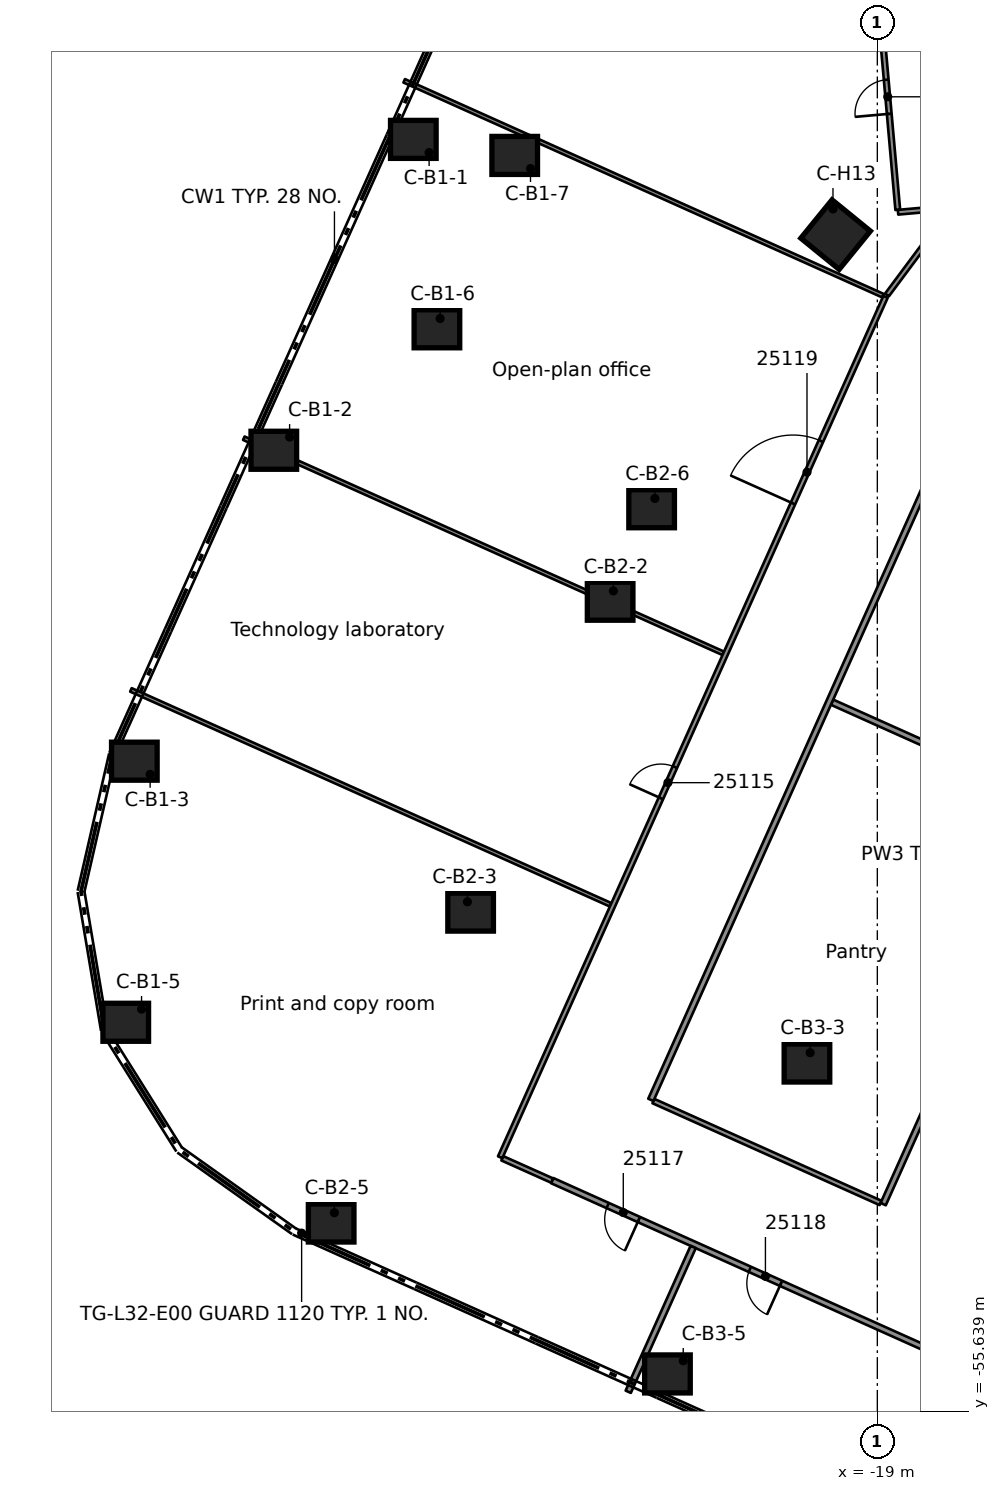
"""IFC4 building model, lengths in metres.
Left out: names, types, materials, properties, quantities, classifications, styles, units other than length and angle.
Written with IfcOpenShell. Run it as: python <this file> out.ifc"""

import sys

from ifc_helpers import new_model, si_unit, direction, frame, frame_2d, origin, origin_2d, place, context, subcontext, project, spatial, rectangle, extrude, element, fill, save


model = new_model("IFC4")
c1 = context("Model", 3, precision=1e-05, world=origin(), true_north=direction((0.0, 1.0)))
c2 = subcontext(c1, "Body", "Model", "MODEL_VIEW")
j1 = project(units=[si_unit("LENGTHUNIT", "METRE"), si_unit("PLANEANGLEUNIT", "RADIAN")], contexts=[c1])
p1 = place(None, origin())
s1 = spatial("IfcSite", under=j1, at=p1, CompositionType="ELEMENT")
p2 = place(p1, origin())
s2 = spatial("IfcBuilding", under=s1, at=p2, CompositionType="ELEMENT")
p3 = place(p2, frame((0.0, 0.0, 127.2)))
s3 = spatial("IfcBuildingStorey", under=s2, at=p3, CompositionType="ELEMENT", Elevation=127.2)
for number, where, z_axis, x_axis in (
    (1, (-31.21, -22.166, 0.0), (0.0, 0.0, 1.0), (1.0, 0.0, 0.0)),
    (2, (-34.881, -30.346, 0.0), (0.0, 0.0, 1.0), (1.0, 0.0, 0.0)),
    (3, (-38.551, -38.527, 0.0), (0.0, 0.0, 1.0), (1.0, 0.0, 0.0)),
    (4, (-38.777, -45.397, 0.0), (0.0, 0.0, 1.0), (1.0, 0.0, 0.0)),
    (5, (-30.589, -27.15, 0.0), (0.0, 0.0, 1.0), (1.0, 0.0, 0.0)),
    (6, (-28.542, -22.588, 0.0), (0.0, 0.0, 1.0), (1.0, 0.0, 0.0)),
    (7, (-26.031, -34.318, 0.0), (0.0, 0.0, 1.0), (1.0, 0.0, 0.0)),
    (8, (-29.702, -42.498, 0.0), (0.0, 0.0, 1.0), (1.0, 0.0, 0.0)),
    (9, (-33.372, -50.679, 0.0), (0.0, 0.0, 1.0), (1.0, 0.0, 0.0)),
    (10, (-24.939, -31.885, 0.0), (0.0, 0.0, 1.0), (1.0, 0.0, 0.0)),
    (11, (-20.852, -46.469, 0.0), (0.0, 0.0, 1.0), (1.0, 0.0, 0.0)),
    (12, (-24.523, -54.65, 0.0), (0.0, 0.0, 1.0), (1.0, 0.0, 0.0)),
):
    element("IfcColumn", number, at=place(p3, frame(where, z_axis=z_axis, x_axis=x_axis)), inside=s3, PredefinedType="COLUMN", context=c2, shape_type="SweptSolid", body=[
        extrude(rectangle(XDim=1.2, YDim=1.0, at=origin_2d()), origin(), (0.0, 0.0, 1.0), 3.5),
    ])
p4 = place(p3, frame((-20.098, -24.672, 0.0), z_axis=(0.0, 0.0, 1.0), x_axis=(-0.631582861875, -0.775308382894, 0.0)))
e13 = element("IfcColumn", 13, at=p4, inside=s3, PredefinedType="COLUMN", context=c2, shape_type="SweptSolid", body=[
    extrude(rectangle(XDim=1.3, YDim=1.3, at=origin_2d()), origin(), (0.0, 0.0, 1.0), 3.5),
])
p5 = place(p3, frame((-18.462, -24.02, 0.0), z_axis=(0.0, 0.0, 1.0), x_axis=(-0.088655965606, 0.996062307169, 0.0)))
e14 = element("IfcWall", 14, at=p5, inside=s3, PredefinedType="PARTITIONING", context=c2, shape_type="SweptSolid", body=[
    extrude(rectangle(XDim=9.545, YDim=0.125, at=frame_2d((4.772, 0.0))), origin(), (0.0, 0.0, 1.0), 3.08),
])
p6 = place(p5, frame((2.536, 0.0, 0.0)))
e15 = element("IfcOpeningElement", 15, at=p6, cuts=e14, PredefinedType="OPENING", context=c2, shape_type="SweptSolid", body=[
    extrude(rectangle(XDim=0.9, YDim=2.1, at=frame_2d((0.45, 1.05))), frame((0.0, 0.073, 0.0), z_axis=(0.0, -1.0, 0.0), x_axis=(1.0, 0.0, 0.0)), (0.0, 0.0, 1.0), 0.145),
])
p7 = place(p3, frame((-17.412, -54.116, 0.0), z_axis=(0.0, 0.0, 1.0), x_axis=(-0.912315908863, 0.409487096787, 0.0)))
e16 = element("IfcWall", 16, at=p7, inside=s3, PredefinedType="PARTITIONING", context=c2, shape_type="SweptSolid", body=[
    extrude(rectangle(XDim=11.119, YDim=0.15, at=frame_2d((5.559, 0.0))), origin(), (0.0, 0.0, 1.0), 3.08),
])
p8 = place(p7, frame((8.618, 0.0, 0.0)))
e17 = element("IfcOpeningElement", 17, at=p8, cuts=e16, PredefinedType="OPENING", context=c2, shape_type="SweptSolid", body=[
    extrude(rectangle(XDim=0.9, YDim=2.1, at=frame_2d((0.45, 1.05))), frame((0.0, 0.085, 0.0), z_axis=(0.0, -1.0, 0.0), x_axis=(1.0, 0.0, 0.0)), (0.0, 0.0, 1.0), 0.17),
])
p9 = place(p7, frame((4.518, 0.0, 0.0)))
e18 = element("IfcOpeningElement", 18, at=p9, cuts=e16, PredefinedType="OPENING", context=c2, shape_type="SweptSolid", body=[
    extrude(rectangle(XDim=0.9, YDim=2.1, at=frame_2d((0.45, 1.05))), frame((0.0, 0.085, 0.0), z_axis=(0.0, -1.0, 0.0), x_axis=(1.0, 0.0, 0.0)), (0.0, 0.0, 1.0), 0.17),
])
p10 = place(p3, frame((-24.892, -47.47, 0.0), z_axis=(0.0, 0.0, 1.0), x_axis=(0.912446481469, -0.409196063588, 0.0)))
e19 = element("IfcWall", 19, at=p10, inside=s3, PredefinedType="PARTITIONING", context=c2, shape_type="SweptSolid", body=[
    extrude(rectangle(XDim=6.552, YDim=0.125, at=frame_2d((3.276, 0.0))), origin(), (0.0, 0.0, 1.0), 3.08),
])
p11 = place(p3, frame((-35.67, -30.029, 0.0), z_axis=(0.0, 0.0, 1.0), x_axis=(0.912388382828, -0.409325590307, 0.0)))
e20 = element("IfcWall", 20, at=p11, inside=s3, PredefinedType="PARTITIONING", context=c2, shape_type="SweptSolid", body=[
    extrude(rectangle(XDim=13.827, YDim=0.1, at=frame_2d((6.914, 0.0))), origin(), (0.0, 0.0, 1.0), 3.08),
])
p12 = place(p3, frame((-20.191, -36.975, 0.0), z_axis=(0.0, 0.0, 1.0), x_axis=(0.912454220663, -0.409178805896, 0.0)))
e21 = element("IfcWall", 21, at=p12, inside=s3, PredefinedType="PARTITIONING", context=c2, shape_type="SweptSolid", body=[
    extrude(rectangle(XDim=6.559, YDim=0.15, at=frame_2d((3.28, 0.0))), origin(), (0.0, 0.0, 1.0), 3.08),
])
p13 = place(p3, frame((-31.45, -20.625, 0.0), z_axis=(0.0, 0.0, 1.0), x_axis=(0.91235405171, -0.409402105916, 0.0)))
e22 = element("IfcWall", 22, at=p13, inside=s3, PredefinedType="PARTITIONING", context=c2, shape_type="SweptSolid", body=[
    extrude(rectangle(XDim=13.808, YDim=0.1, at=frame_2d((6.904, 0.0))), origin(), (0.0, 0.0, 1.0), 3.08),
])
p14 = place(p3, frame((-28.868, -48.976, 0.0), z_axis=(0.0, 0.0, 1.0), x_axis=(0.912828249158, -0.4083437125, 0.0)))
e23 = element("IfcWall", 23, at=p14, inside=s3, PredefinedType="PARTITIONING", context=c2, shape_type="SweptSolid", body=[
    extrude(rectangle(XDim=1.437, YDim=0.125, at=frame_2d((0.719, 0.0))), origin(), (0.0, 0.0, 1.0), 3.08),
])
p15 = place(p3, frame((-38.641, -36.651, 0.0), z_axis=(0.0, 0.0, 1.0), x_axis=(0.912605853038, -0.408840503132, 0.0)))
e24 = element("IfcWall", 24, at=p15, inside=s3, PredefinedType="PARTITIONING", context=c2, shape_type="SweptSolid", body=[
    extrude(rectangle(XDim=13.832, YDim=0.1, at=frame_2d((6.916, 0.0))), origin(), (0.0, 0.0, 1.0), 3.08),
])
p16 = place(p3, frame((-18.455, -24.083, 0.0), z_axis=(0.0, 0.0, 1.0), x_axis=(0.996054818248, 0.088740064481, 0.0)))
e25 = element("IfcWall", 25, at=p16, inside=s3, PredefinedType="PARTITIONING", context=c2, shape_type="SweptSolid", body=[
    extrude(rectangle(XDim=0.699, YDim=0.125, at=frame_2d((0.349, 0.0))), origin(), (0.0, 0.0, 1.0), 3.08),
])
p17 = place(p3, frame((-17.355, -24.392, 0.0), z_axis=(0.0, 0.0, 1.0), x_axis=(-0.597497187646, -0.801871006306, 0.0)))
e26 = element("IfcWall", 26, at=p17, inside=s3, PredefinedType="PARTITIONING", context=c2, shape_type="SweptSolid", body=[
    extrude(rectangle(XDim=2.328, YDim=0.125, at=frame_2d((1.164, 0.0))), origin(), (0.0, 0.0, 1.0), 3.08),
])
p18 = place(p3, frame((-18.846, -50.182, 0.0), z_axis=(0.0, 0.0, 1.0), x_axis=(0.409371431607, 0.912367815622, 0.0)))
e27 = element("IfcWall", 27, at=p18, inside=s3, PredefinedType="PARTITIONING", context=c2, shape_type="SweptSolid", body=[
    extrude(rectangle(XDim=21.438, YDim=0.15, at=frame_2d((10.719, 0.0))), origin(), (0.0, 0.0, 1.0), 3.08),
])
p19 = place(p18, frame((16.1, 0.0, 0.0)))
e28 = element("IfcOpeningElement", 28, at=p19, cuts=e27, PredefinedType="OPENING", context=c2, shape_type="SweptSolid", body=[
    extrude(rectangle(XDim=0.9, YDim=2.1, at=frame_2d((0.45, 1.05))), frame((0.0, 0.085, 0.0), z_axis=(0.0, -1.0, 0.0), x_axis=(1.0, 0.0, 0.0)), (0.0, 0.0, 1.0), 0.17),
])
p20 = place(p18, frame((5.35, 0.0, 0.0)))
e29 = element("IfcOpeningElement", 29, at=p20, cuts=e27, PredefinedType="OPENING", context=c2, shape_type="SweptSolid", body=[
    extrude(rectangle(XDim=0.9, YDim=2.1, at=frame_2d((0.45, 1.05))), frame((0.0, 0.085, 0.0), z_axis=(0.0, -1.0, 0.0), x_axis=(1.0, 0.0, 0.0)), (0.0, 0.0, 1.0), 0.17),
])
p21 = place(p3, frame((-25.555, -55.119, 0.0), z_axis=(0.0, 0.0, 1.0), x_axis=(0.409369884525, 0.912368509783, 0.0)))
e30 = element("IfcWall", 30, at=p21, inside=s3, PredefinedType="PARTITIONING", context=c2, shape_type="SweptSolid", body=[
    extrude(rectangle(XDim=4.175, YDim=0.15, at=frame_2d((2.087, 0.0))), origin(), (0.0, 0.0, 1.0), 3.08),
])
p22 = place(p3, frame((-24.96, -47.439, 0.0), z_axis=(0.0, 0.0, 1.0), x_axis=(0.408787781409, 0.912629470141, 0.0)))
e31 = element("IfcWall", 31, at=p22, inside=s3, PredefinedType="PARTITIONING", context=c2, shape_type="SweptSolid", body=[
    extrude(rectangle(XDim=21.806, YDim=0.15, at=frame_2d((10.903, 0.0))), origin(), (0.0, 0.0, 1.0), 3.08),
])
p23 = place(p3, frame((-28.925, -48.949, 0.0), z_axis=(0.0, 0.0, 1.0), x_axis=(0.408793939156, 0.91262671192, 0.0)))
e32 = element("IfcWall", 32, at=p23, inside=s3, PredefinedType="PARTITIONING", context=c2, shape_type="SweptSolid", body=[
    extrude(rectangle(XDim=24.807, YDim=0.125, at=frame_2d((12.404, 0.0))), origin(), (0.0, 0.0, 1.0), 3.08),
])
p24 = place(p23, frame((10.351, 0.0, 0.0)))
e33 = element("IfcOpeningElement", 33, at=p24, cuts=e32, PredefinedType="OPENING", context=c2, shape_type="SweptSolid", body=[
    extrude(rectangle(XDim=0.9, YDim=2.1, at=frame_2d((0.45, 1.05))), frame((0.0, 0.073, 0.0), z_axis=(0.0, -1.0, 0.0), x_axis=(1.0, 0.0, 0.0)), (0.0, 0.0, 1.0), 0.145),
])
p25 = place(p23, frame((18.851, 0.0, 0.0)))
e34 = element("IfcOpeningElement", 34, at=p25, cuts=e32, PredefinedType="OPENING", context=c2, shape_type="SweptSolid", body=[
    extrude(rectangle(XDim=1.8, YDim=2.1, at=frame_2d((0.9, 1.05))), frame((0.0, 0.073, 0.0), z_axis=(0.0, -1.0, 0.0), x_axis=(1.0, 0.0, 0.0)), (0.0, 0.0, 1.0), 0.145),
])
p26 = place(p24, origin())
e35 = element("IfcDoor", 35, at=p26, inside=s3, OperationType="SINGLE_SWING_LEFT", PredefinedType="DOOR", context=c2, shape_type="SweptSolid", body=[
    extrude(rectangle(XDim=0.9, YDim=2.1, at=frame_2d((0.45, 1.05))), frame((0.0, 0.025, 0.0), z_axis=(0.0, -1.0, 0.0), x_axis=(1.0, 0.0, 0.0)), (0.0, 0.0, 1.0), 0.05),
])
fill(e33, e35)
p27 = place(p8, origin())
e36 = element("IfcDoor", 36, at=p27, inside=s3, OperationType="SINGLE_SWING_RIGHT", PredefinedType="DOOR", context=c2, shape_type="SweptSolid", body=[
    extrude(rectangle(XDim=0.9, YDim=2.1, at=frame_2d((0.45, 1.05))), frame((0.0, 0.025, 0.0), z_axis=(0.0, -1.0, 0.0), x_axis=(1.0, 0.0, 0.0)), (0.0, 0.0, 1.0), 0.05),
])
fill(e17, e36)
p28 = place(p9, origin())
e37 = element("IfcDoor", 37, at=p28, inside=s3, OperationType="SINGLE_SWING_LEFT", PredefinedType="DOOR", context=c2, shape_type="SweptSolid", body=[
    extrude(rectangle(XDim=0.9, YDim=2.1, at=frame_2d((0.45, 1.05))), frame((0.0, 0.025, 0.0), z_axis=(0.0, -1.0, 0.0), x_axis=(1.0, 0.0, 0.0)), (0.0, 0.0, 1.0), 0.05),
])
fill(e18, e37)
p29 = place(p25, origin())
e38 = element("IfcDoor", 38, at=p29, inside=s3, OperationType="DOUBLE_DOOR_SINGLE_SWING", PredefinedType="DOOR", context=c2, shape_type="SweptSolid", body=[
    extrude(rectangle(XDim=1.8, YDim=2.1, at=frame_2d((0.9, 1.05))), frame((0.0, 0.025, 0.0), z_axis=(0.0, -1.0, 0.0), x_axis=(1.0, 0.0, 0.0)), (0.0, 0.0, 1.0), 0.05),
])
fill(e34, e38)
p30 = place(p6, origin())
e39 = element("IfcDoor", 39, at=p30, inside=s3, OperationType="SINGLE_SWING_LEFT", PredefinedType="DOOR", context=c2, shape_type="SweptSolid", body=[
    extrude(rectangle(XDim=0.9, YDim=2.1, at=frame_2d((0.45, 1.05))), frame((0.0, 0.025, 0.0), z_axis=(0.0, -1.0, 0.0), x_axis=(1.0, 0.0, 0.0)), (0.0, 0.0, 1.0), 0.05),
])
fill(e15, e39)
save(model, sys.argv[1])
